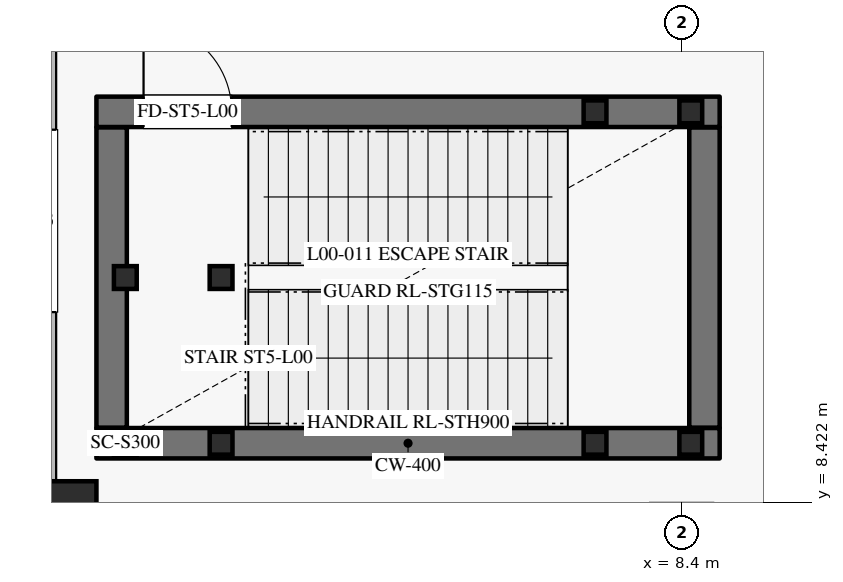
"""IFC4 building model, lengths in metres.
Left out: names, types, materials, properties, quantities, classifications, styles, units other than length and angle.
Written with IfcOpenShell. Run it as: python <this file> out.ifc"""

import sys

from ifc_helpers import new_model, si_unit, direction, frame, frame_2d, origin, origin_2d, place, context, subcontext, project, spatial, rectangle, hollow_rectangle, circle, extrude, element, fill, save


model = new_model("IFC4")
c1 = context("Model", 3, precision=1e-05, world=origin(), true_north=direction((0.0, 1.0)))
c2 = subcontext(c1, "Body", "Model", "MODEL_VIEW")
j1 = project(units=[si_unit("LENGTHUNIT", "METRE"), si_unit("PLANEANGLEUNIT", "RADIAN")], contexts=[c1])
p1 = place(None, origin())
s1 = spatial("IfcSite", under=j1, at=p1, CompositionType="ELEMENT")
p2 = place(p1, origin())
s2 = spatial("IfcBuilding", under=s1, at=p2, CompositionType="ELEMENT")
p3 = place(p2, origin())
s3 = spatial("IfcBuildingStorey", under=s2, at=p3, CompositionType="ELEMENT", Elevation=0.0)
p4 = place(p3, frame((0.0, 8.0, 0.0), z_axis=(0.0, 0.0, 1.0), x_axis=(1.0, 0.0, 0.0)))
e1 = element("IfcColumn", 1, at=p4, inside=s3, PredefinedType="COLUMN", context=c2, shape_type="SweptSolid", body=[
    extrude(circle(Radius=0.7, at=origin_2d()), origin(), (0.0, 0.0, 1.0), 6.0),
])
p5 = place(p3, frame((0.0, 8.7, 0.0), z_axis=(0.0, 0.0, 1.0), x_axis=(0.0, 1.0, 0.0)))
e2 = element("IfcWall", 2, at=p5, inside=s3, PredefinedType="SOLIDWALL", context=c2, shape_type="SweptSolid", body=[
    extrude(rectangle(XDim=6.85, YDim=0.34, at=frame_2d((3.425, 0.0))), origin(), (0.0, 0.0, 1.0), 5.0),
])
p6 = place(p5, frame((2.225, 0.0, 0.0)))
e3 = element("IfcOpeningElement", 3, at=p6, cuts=e2, PredefinedType="OPENING", context=c2, shape_type="SweptSolid", body=[
    extrude(rectangle(XDim=2.4, YDim=2.6, at=frame_2d((1.2, 1.3))), frame((0.0, 0.18, 0.0), z_axis=(0.0, -1.0, 0.0), x_axis=(1.0, 0.0, 0.0)), (0.0, 0.0, 1.0), 0.36),
])
p7 = place(p3, frame((0.7, 9.2, 0.0), z_axis=(0.0, 0.0, 1.0), x_axis=(1.0, 0.0, 0.0)))
e4 = element("IfcWall", 4, at=p7, inside=s3, PredefinedType="SHEAR", context=c2, shape_type="SweptSolid", body=[
    extrude(rectangle(XDim=8.2, YDim=0.4, at=frame_2d((4.1, 0.0))), origin(), (0.0, 0.0, 1.0), 5.675),
])
p8 = place(p3, frame((8.7, 9.405, 0.0), z_axis=(0.0, 0.0, 1.0), x_axis=(0.0, 1.0, 0.0)))
e5 = element("IfcWall", 5, at=p8, inside=s3, PredefinedType="SHEAR", context=c2, shape_type="SweptSolid", body=[
    extrude(rectangle(XDim=3.95, YDim=0.4, at=frame_2d((1.975, 0.0))), origin(), (0.0, 0.0, 1.0), 5.675),
])
p9 = place(p3, frame((0.7, 13.56, 0.0), z_axis=(0.0, 0.0, 1.0), x_axis=(1.0, 0.0, 0.0)))
e6 = element("IfcWall", 6, at=p9, inside=s3, PredefinedType="SHEAR", context=c2, shape_type="SweptSolid", body=[
    extrude(rectangle(XDim=8.2, YDim=0.4, at=frame_2d((4.1, 0.0))), origin(), (0.0, 0.0, 1.0), 5.675),
])
p10 = place(p9, frame((0.62, 0.0, 0.0)))
e7 = element("IfcOpeningElement", 7, at=p10, cuts=e6, PredefinedType="OPENING", context=c2, shape_type="SweptSolid", body=[
    extrude(rectangle(XDim=1.16, YDim=2.2, at=frame_2d((0.58, 1.1))), frame((0.0, 0.21, 0.0), z_axis=(0.0, -1.0, 0.0), x_axis=(1.0, 0.0, 0.0)), (0.0, 0.0, 1.0), 0.42),
])
p11 = place(p3, frame((0.9, 9.405, 0.0), z_axis=(0.0, 0.0, 1.0), x_axis=(0.0, 1.0, 0.0)))
e8 = element("IfcWall", 8, at=p11, inside=s3, PredefinedType="SHEAR", context=c2, shape_type="SweptSolid", body=[
    extrude(rectangle(XDim=3.95, YDim=0.4, at=frame_2d((1.975, 0.0))), origin(), (0.0, 0.0, 1.0), 5.675),
])
for number, where, z_axis, x_axis in (
    (9, (1.08, 9.2, 0.0), (0.0, 0.0, 1.0), (1.0, 0.0, 0.0)),
    (10, (1.08, 11.38, 0.0), (0.0, 0.0, 1.0), (1.0, 0.0, 0.0)),
    (11, (2.34, 9.2, 0.0), (0.0, 0.0, 1.0), (1.0, 0.0, 0.0)),
    (12, (2.34, 11.38, 0.0), (0.0, 0.0, 1.0), (1.0, 0.0, 0.0)),
):
    element("IfcColumn", number, at=place(p3, frame(where, z_axis=z_axis, x_axis=x_axis)), inside=s3, PredefinedType="COLUMN", context=c2, shape_type="SweptSolid", body=[
        extrude(hollow_rectangle(XDim=0.3, YDim=0.3, WallThickness=0.012, at=origin_2d()), origin(), (0.0, 0.0, 1.0), 5.82),
    ])
for number, where, z_axis, x_axis in (
    (13, (7.26, 9.2, -2.7), (0.0, 0.0, 1.0), (1.0, 0.0, 0.0)),
    (14, (7.26, 13.56, -2.7), (0.0, 0.0, 1.0), (1.0, 0.0, 0.0)),
    (15, (8.52, 9.2, -2.7), (0.0, 0.0, 1.0), (1.0, 0.0, 0.0)),
    (16, (8.52, 13.56, -2.7), (0.0, 0.0, 1.0), (1.0, 0.0, 0.0)),
):
    element("IfcColumn", number, at=place(p3, frame(where, z_axis=z_axis, x_axis=x_axis)), inside=s3, PredefinedType="COLUMN", context=c2, shape_type="SweptSolid", body=[
        extrude(hollow_rectangle(XDim=0.3, YDim=0.3, WallThickness=0.012, at=origin_2d()), origin(), (0.0, 0.0, 1.0), 5.52),
    ])
p12 = place(p10, origin())
e17 = element("IfcDoor", 17, at=p12, inside=s3, OperationType="SINGLE_SWING_LEFT", PredefinedType="DOOR", context=c2, shape_type="SweptSolid", body=[
    extrude(rectangle(XDim=1.16, YDim=2.2, at=frame_2d((0.58, 1.1))), frame((0.0, 0.025, 0.0), z_axis=(0.0, -1.0, 0.0), x_axis=(1.0, 0.0, 0.0)), (0.0, 0.0, 1.0), 0.05),
])
fill(e7, e17)
save(model, sys.argv[1])
